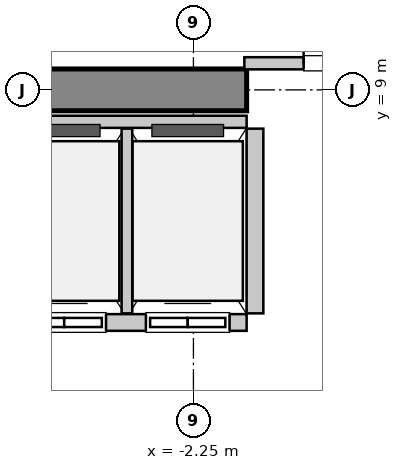
"""IFC4 building model, lengths in metres.
Left out: names, types, materials, properties, quantities, classifications, styles, units other than length and angle.
Written with IfcOpenShell. Run it as: python <this file> out.ifc"""

import sys

from ifc_helpers import new_model, si_unit, direction, frame, frame_2d, origin, place, context, subcontext, project, spatial, rectangle, extrude, source, transform, mapped, element, fill, save


model = new_model("IFC4")
c1 = context("Model", 3, precision=1e-05, world=origin(), true_north=direction((0.0, 1.0)))
c2 = subcontext(c1, "Body", "Model", "MODEL_VIEW")
j1 = project(units=[si_unit("LENGTHUNIT", "METRE"), si_unit("PLANEANGLEUNIT", "RADIAN")], contexts=[c1])
p1 = place(None, origin())
s1 = spatial("IfcSite", under=j1, at=p1, CompositionType="ELEMENT")
p2 = place(p1, origin())
s2 = spatial("IfcBuilding", under=s1, at=p2, CompositionType="ELEMENT")
p3 = place(p2, frame((0.0, 0.0, 106.0)))
s3 = spatial("IfcBuildingStorey", under=s2, at=p3, CompositionType="ELEMENT", Elevation=106.0)
m1 = source(origin(), c2, "Body", "SweptSolid", [
    extrude(rectangle(XDim=9.975, YDim=0.55, at=frame_2d((4.987, 0.0))), origin(), (0.0, 0.0, 1.0), 3.8),
])
p4 = place(p3, frame((-11.525, 9.0, 0.0), z_axis=(0.0, 0.0, 1.0), x_axis=(1.0, 0.0, 0.0)))
e1 = element("IfcWall", 1, at=p4, inside=s3, PredefinedType="SHEAR", context=c2, shape_type="MappedRepresentation", body=[
    mapped(m1, transform((0.0, 0.0, 0.0), x_axis=(1.0, 0.0, 0.0), y_axis=(0.0, 1.0, 0.0), z_axis=(0.0, 0.0, 1.0), scale=1.0)),
])
m2 = source(origin(), c2, "Body", "SweptSolid", [
    extrude(rectangle(XDim=3.2, YDim=0.22, at=frame_2d((1.6, 0.0))), origin(), (0.0, 0.0, 1.0), 3.535),
])
p5 = place(p3, frame((-4.75, 5.94, 0.0), z_axis=(0.0, 0.0, 1.0), x_axis=(1.0, 0.0, 0.0)))
e2 = element("IfcWall", 2, at=p5, inside=s3, PredefinedType="SOLIDWALL", context=c2, shape_type="MappedRepresentation", body=[
    mapped(m2, transform((0.0, 0.0, 0.0), x_axis=(1.0, 0.0, 0.0), y_axis=(0.0, 1.0, 0.0), z_axis=(0.0, 0.0, 1.0), scale=1.0)),
])
p6 = place(p5, frame((0.25, 0.0, 0.0)))
e3 = element("IfcOpeningElement", 3, at=p6, cuts=e2, PredefinedType="OPENING", context=c2, shape_type="SweptSolid", body=[
    extrude(rectangle(XDim=1.1, YDim=2.2, at=frame_2d((0.55, 1.1))), frame((0.0, 0.12, 0.0), z_axis=(0.0, -1.0, 0.0), x_axis=(1.0, 0.0, 0.0)), (0.0, 0.0, 1.0), 0.24),
])
p7 = place(p5, frame((1.875, 0.0, 0.0)))
e4 = element("IfcOpeningElement", 4, at=p7, cuts=e2, PredefinedType="OPENING", context=c2, shape_type="SweptSolid", body=[
    extrude(rectangle(XDim=1.1, YDim=2.2, at=frame_2d((0.55, 1.1))), frame((0.0, 0.12, 0.0), z_axis=(0.0, -1.0, 0.0), x_axis=(1.0, 0.0, 0.0)), (0.0, 0.0, 1.0), 0.24),
])
m3 = source(origin(), c2, "Body", "SweptSolid", [
    extrude(rectangle(XDim=3.2, YDim=0.16, at=frame_2d((1.6, 0.0))), origin(), (0.0, 0.0, 1.0), 2.425),
])
p8 = place(p3, frame((-1.55, 8.58, 0.0), z_axis=(0.0, 0.0, 1.0), x_axis=(-1.0, 0.0, 0.0)))
e5 = element("IfcWall", 5, at=p8, inside=s3, PredefinedType="PARTITIONING", context=c2, shape_type="MappedRepresentation", body=[
    mapped(m3, transform((0.0, 0.0, 0.0), x_axis=(1.0, 0.0, 0.0), y_axis=(0.0, 1.0, 0.0), z_axis=(0.0, 0.0, 1.0), scale=1.0)),
])
m4 = source(origin(), c2, "Body", "SweptSolid", [
    extrude(rectangle(XDim=2.43, YDim=0.14, at=frame_2d((1.215, 0.0))), origin(), (0.0, 0.0, 1.0), 3.535),
])
p9 = place(p3, frame((-3.125, 6.06, 0.0), z_axis=(0.0, 0.0, 1.0), x_axis=(0.0, 1.0, 0.0)))
e6 = element("IfcWall", 6, at=p9, inside=s3, PredefinedType="PARTITIONING", context=c2, shape_type="MappedRepresentation", body=[
    mapped(m4, transform((0.0, 0.0, 0.0), x_axis=(1.0, 0.0, 0.0), y_axis=(0.0, 1.0, 0.0), z_axis=(0.0, 0.0, 1.0), scale=1.0)),
])
m5 = source(origin(), c2, "Body", "SweptSolid", [
    extrude(rectangle(XDim=2.43, YDim=0.22, at=frame_2d((1.215, 0.0))), origin(), (0.0, 0.0, 1.0), 3.535),
])
p10 = place(p3, frame((-1.44, 6.06, 0.0), z_axis=(0.0, 0.0, 1.0), x_axis=(0.0, 1.0, 0.0)))
e7 = element("IfcWall", 7, at=p10, inside=s3, PredefinedType="SOLIDWALL", context=c2, shape_type="MappedRepresentation", body=[
    mapped(m5, transform((0.0, 0.0, 0.0), x_axis=(1.0, 0.0, 0.0), y_axis=(0.0, 1.0, 0.0), z_axis=(0.0, 0.0, 1.0), scale=1.0)),
])
m6 = source(origin(), c2, "Body", "SweptSolid", [
    extrude(rectangle(XDim=3.16, YDim=0.16, at=frame_2d((1.58, 0.0))), origin(), (0.0, 0.0, 1.0), 2.425),
])
p11 = place(p3, frame((-1.58, 9.35, 0.0), z_axis=(0.0, 0.0, 1.0), x_axis=(1.0, 0.0, 0.0)))
e8 = element("IfcWall", 8, at=p11, inside=s3, PredefinedType="PARTITIONING", context=c2, shape_type="MappedRepresentation", body=[
    mapped(m6, transform((0.0, 0.0, 0.0), x_axis=(1.0, 0.0, 0.0), y_axis=(0.0, 1.0, 0.0), z_axis=(0.0, 0.0, 1.0), scale=1.0)),
])
p12 = place(p11, frame((0.78, 0.0, 0.0)))
e9 = element("IfcOpeningElement", 9, at=p12, cuts=e8, PredefinedType="OPENING", context=c2, shape_type="SweptSolid", body=[
    extrude(rectangle(XDim=1.6, YDim=2.3, at=frame_2d((0.8, 1.15))), frame((0.0, 0.09, 0.0), z_axis=(0.0, -1.0, 0.0), x_axis=(1.0, 0.0, 0.0)), (0.0, 0.0, 1.0), 0.18),
])
m7 = source(origin(), c2, "Body", "SweptSolid", [
    extrude(rectangle(XDim=1.1, YDim=2.2, at=frame_2d((0.55, 1.1))), frame((0.0, 0.025, 0.0), z_axis=(0.0, -1.0, 0.0), x_axis=(1.0, 0.0, 0.0)), (0.0, 0.0, 1.0), 0.05),
])
p13 = place(p6, origin())
e10 = element("IfcDoor", 10, at=p13, inside=s3, OperationType="DOUBLE_DOOR_SLIDING", PredefinedType="DOOR", context=c2, shape_type="MappedRepresentation", body=[
    mapped(m7, transform((0.0, 0.0, 0.0), x_axis=(1.0, 0.0, 0.0), y_axis=(0.0, 1.0, 0.0), z_axis=(0.0, 0.0, 1.0), scale=1.0)),
])
fill(e3, e10)
p14 = place(p7, origin())
e11 = element("IfcDoor", 11, at=p14, inside=s3, OperationType="DOUBLE_DOOR_SLIDING", PredefinedType="DOOR", context=c2, shape_type="MappedRepresentation", body=[
    mapped(m7, transform((0.0, 0.0, 0.0), x_axis=(1.0, 0.0, 0.0), y_axis=(0.0, 1.0, 0.0), z_axis=(0.0, 0.0, 1.0), scale=1.0)),
])
fill(e4, e11)
m8 = source(origin(), c2, "Body", "SweptSolid", [
    extrude(rectangle(XDim=1.6, YDim=2.3, at=frame_2d((0.8, 1.15))), frame((0.0, 0.025, 0.0), z_axis=(0.0, -1.0, 0.0), x_axis=(1.0, 0.0, 0.0)), (0.0, 0.0, 1.0), 0.05),
])
p15 = place(p12, origin())
e12 = element("IfcDoor", 12, at=p15, inside=s3, OperationType="DOUBLE_DOOR_SINGLE_SWING", PredefinedType="DOOR", context=c2, shape_type="MappedRepresentation", body=[
    mapped(m8, transform((0.0, 0.0, 0.0), x_axis=(1.0, 0.0, 0.0), y_axis=(0.0, 1.0, 0.0), z_axis=(0.0, 0.0, 1.0), scale=1.0)),
])
fill(e9, e12)
save(model, sys.argv[1])
